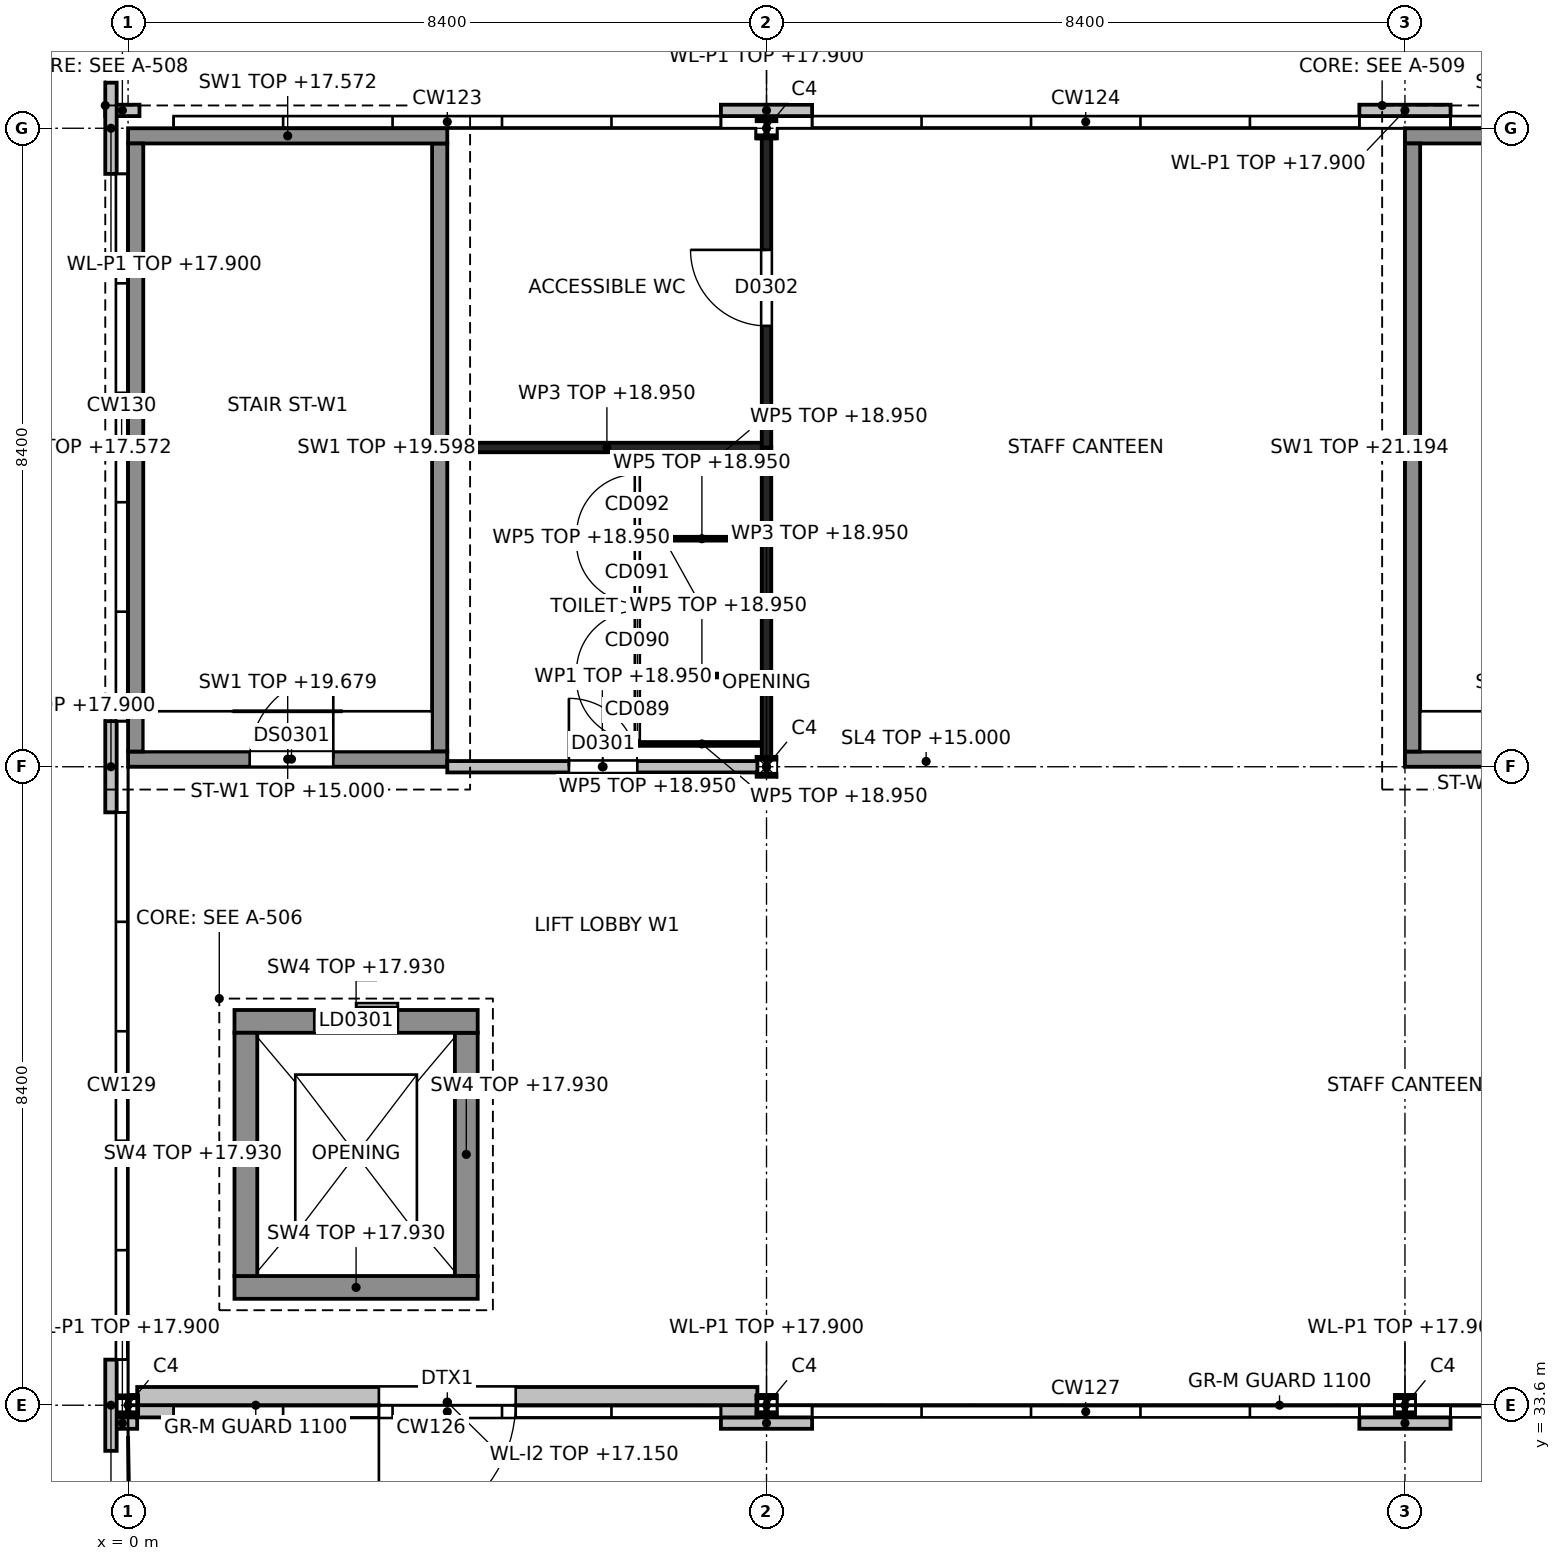
"""IFC4 building model, lengths in metres.
Left out: names, types, materials, properties, quantities, classifications, styles, units other than length and angle.
Written with IfcOpenShell. Run it as: python <this file> out.ifc"""

import sys

from ifc_helpers import new_model, si_unit, direction, frame, frame_2d, origin, origin_2d, place, context, subcontext, project, spatial, polyline, rectangle, i_section, outline, extrude, element, fill, save


model = new_model("IFC4")
c1 = context("Model", 3, precision=1e-05, world=origin(), true_north=direction((0.0, 1.0)))
c2 = subcontext(c1, "Body", "Model", "MODEL_VIEW")
j1 = project(units=[si_unit("LENGTHUNIT", "METRE"), si_unit("PLANEANGLEUNIT", "RADIAN")], contexts=[c1])
p1 = place(None, origin())
s1 = spatial("IfcSite", under=j1, at=p1, CompositionType="ELEMENT")
p2 = place(p1, origin())
s2 = spatial("IfcBuilding", under=s1, at=p2, CompositionType="ELEMENT")
p3 = place(p2, frame((0.0, 0.0, 15.0)))
s3 = spatial("IfcBuildingStorey", under=s2, at=p3, CompositionType="ELEMENT", Elevation=15.0)
for number, where, z_axis, x_axis in (
    (1, (0.0, 33.6, 0.0), (0.0, 0.0, 1.0), (1.0, 0.0, 0.0)),
    (2, (8.4, 33.6, 0.0), (0.0, 0.0, 1.0), (1.0, 0.0, 0.0)),
):
    element("IfcColumn", number, at=place(p3, frame(where, z_axis=z_axis, x_axis=x_axis)), inside=s3, PredefinedType="COLUMN", context=c2, shape_type="SweptSolid", body=[
        extrude(i_section(OverallWidth=0.24, OverallDepth=0.24, WebThickness=0.01, FlangeThickness=0.017, at=origin_2d()), origin(), (0.0, 0.0, 1.0), 2.635),
    ])
p4 = place(p3, frame((8.4, 42.0, 0.0), z_axis=(0.0, 0.0, 1.0), x_axis=(1.0, 0.0, 0.0)))
e3 = element("IfcColumn", 3, at=p4, inside=s3, PredefinedType="COLUMN", context=c2, shape_type="SweptSolid", body=[
    extrude(i_section(OverallWidth=0.24, OverallDepth=0.24, WebThickness=0.01, FlangeThickness=0.017, at=origin_2d()), origin(), (0.0, 0.0, 1.0), 6.029),
])
for number, where, z_axis, x_axis in (
    (4, (8.4, 50.4, 0.0), (0.0, 0.0, 1.0), (1.0, 0.0, 0.0)),
    (5, (16.8, 33.6, 0.0), (0.0, 0.0, 1.0), (1.0, 0.0, 0.0)),
):
    element("IfcColumn", number, at=place(p3, frame(where, z_axis=z_axis, x_axis=x_axis)), inside=s3, PredefinedType="COLUMN", context=c2, shape_type="SweptSolid", body=[
        extrude(i_section(OverallWidth=0.24, OverallDepth=0.24, WebThickness=0.01, FlangeThickness=0.017, at=origin_2d()), origin(), (0.0, 0.0, 1.0), 2.635),
    ])
p5 = place(p3, frame((0.0, 42.1, 0.0), z_axis=(0.0, 0.0, 1.0), x_axis=(1.0, 0.0, 0.0)))
e6 = element("IfcWall", 6, at=p5, inside=s3, PredefinedType="SHEAR", context=c2, shape_type="SweptSolid", body=[
    extrude(outline(polyline([(0.0, 0.0), (4.2, 0.0), (4.2, 4.679), (0.247, 3.082), (0.0, 2.572), (0.0, 0.0)])), frame((0.0, 0.1, 0.0), z_axis=(0.0, -1.0, 0.0), x_axis=(1.0, 0.0, 0.0)), (0.0, 0.0, 1.0), 0.2),
])
p6 = place(p5, frame((1.6, 0.0, 0.0)))
e7 = element("IfcOpeningElement", 7, at=p6, cuts=e6, PredefinedType="OPENING", context=c2, shape_type="SweptSolid", body=[
    extrude(rectangle(XDim=1.1, YDim=2.1, at=frame_2d((0.55, 1.05))), frame((0.0, 0.1, 0.0), z_axis=(0.0, -1.0, 0.0), x_axis=(1.0, 0.0, 0.0)), (0.0, 0.0, 1.0), 0.2),
])
p7 = place(p3, frame((0.0, 50.3, 0.0), z_axis=(0.0, 0.0, 1.0), x_axis=(1.0, 0.0, 0.0)))
e8 = element("IfcWall", 8, at=p7, inside=s3, PredefinedType="SHEAR", context=c2, shape_type="SweptSolid", body=[
    extrude(outline(polyline([(0.0, 0.0), (4.2, 0.0), (4.2, 2.572), (0.0, 2.572), (0.0, 0.0)])), frame((0.0, 0.1, 0.0), z_axis=(0.0, -1.0, 0.0), x_axis=(1.0, 0.0, 0.0)), (0.0, 0.0, 1.0), 0.2),
])
p8 = place(p3, frame((0.1, 42.2, 0.0), z_axis=(0.0, 0.0, 1.0), x_axis=(0.0, 1.0, 0.0)))
e9 = element("IfcWall", 9, at=p8, inside=s3, PredefinedType="SHEAR", context=c2, shape_type="SweptSolid", body=[
    extrude(outline(polyline([(0.0, 0.0), (8.0, 0.0), (8.0, 2.572), (0.0, 2.572), (0.0, 0.0)])), frame((0.0, 0.1, 0.0), z_axis=(0.0, -1.0, 0.0), x_axis=(1.0, 0.0, 0.0)), (0.0, 0.0, 1.0), 0.2),
])
p9 = place(p3, frame((4.1, 42.2, 0.0), z_axis=(0.0, 0.0, 1.0), x_axis=(0.0, 1.0, 0.0)))
e10 = element("IfcWall", 10, at=p9, inside=s3, PredefinedType="SHEAR", context=c2, shape_type="SweptSolid", body=[
    extrude(outline(polyline([(0.0, 0.0), (8.0, 0.0), (8.0, 3.062), (4.5, 4.477), (4.25, 4.177), (4.0, 4.228), (3.75, 4.598), (0.0, 4.598), (0.0, 0.0)])), frame((0.0, 0.1, 0.0), z_axis=(0.0, -1.0, 0.0), x_axis=(1.0, 0.0, 0.0)), (0.0, 0.0, 1.0), 0.2),
])
p10 = place(p3, frame((16.8, 42.1, 0.0), z_axis=(0.0, 0.0, 1.0), x_axis=(1.0, 0.0, 0.0)))
e11 = element("IfcWall", 11, at=p10, inside=s3, PredefinedType="SHEAR", context=c2, shape_type="SweptSolid", body=[
    extrude(outline(polyline([(0.0, 0.0), (4.2, 0.0), (4.2, 4.679), (0.494, 6.176), (0.247, 5.875), (0.0, 5.925), (0.0, 0.0)])), frame((0.0, 0.1, 0.0), z_axis=(0.0, -1.0, 0.0), x_axis=(1.0, 0.0, 0.0)), (0.0, 0.0, 1.0), 0.2),
])
p11 = place(p10, frame((1.6, 0.0, 0.0)))
e12 = element("IfcOpeningElement", 12, at=p11, cuts=e11, PredefinedType="OPENING", context=c2, shape_type="SweptSolid", body=[
    extrude(rectangle(XDim=1.1, YDim=2.1, at=frame_2d((0.55, 1.05))), frame((0.0, 0.1, 0.0), z_axis=(0.0, -1.0, 0.0), x_axis=(1.0, 0.0, 0.0)), (0.0, 0.0, 1.0), 0.2),
])
p12 = place(p3, frame((16.8, 50.3, 0.0), z_axis=(0.0, 0.0, 1.0), x_axis=(1.0, 0.0, 0.0)))
e13 = element("IfcWall", 13, at=p12, inside=s3, PredefinedType="SHEAR", context=c2, shape_type="SweptSolid", body=[
    extrude(outline(polyline([(0.0, 0.0), (4.2, 0.0), (4.2, 2.572), (0.0, 2.572), (0.0, 0.0)])), frame((0.0, 0.1, 0.0), z_axis=(0.0, -1.0, 0.0), x_axis=(1.0, 0.0, 0.0)), (0.0, 0.0, 1.0), 0.2),
])
p13 = place(p3, frame((16.9, 42.2, 0.0), z_axis=(0.0, 0.0, 1.0), x_axis=(0.0, 1.0, 0.0)))
e14 = element("IfcWall", 14, at=p13, inside=s3, PredefinedType="SHEAR", context=c2, shape_type="SweptSolid", body=[
    extrude(outline(polyline([(0.0, 0.0), (8.0, 0.0), (8.0, 3.062), (0.25, 6.194), (0.0, 5.885), (0.0, 0.0)])), frame((0.0, 0.1, 0.0), z_axis=(0.0, -1.0, 0.0), x_axis=(1.0, 0.0, 0.0)), (0.0, 0.0, 1.0), 0.2),
])
p14 = place(p3, frame((1.4, 35.15, 0.0), z_axis=(0.0, 0.0, 1.0), x_axis=(1.0, 0.0, 0.0)))
e15 = element("IfcWall", 15, at=p14, inside=s3, PredefinedType="SHEAR", context=c2, shape_type="SweptSolid", body=[
    extrude(rectangle(XDim=3.2, YDim=0.3, at=frame_2d((1.6, 0.0))), origin(), (0.0, 0.0, 1.0), 2.93),
])
p15 = place(p3, frame((1.4, 38.65, 0.0), z_axis=(0.0, 0.0, 1.0), x_axis=(1.0, 0.0, 0.0)))
e16 = element("IfcWall", 16, at=p15, inside=s3, PredefinedType="SHEAR", context=c2, shape_type="SweptSolid", body=[
    extrude(rectangle(XDim=3.2, YDim=0.3, at=frame_2d((1.6, 0.0))), origin(), (0.0, 0.0, 1.0), 2.93),
])
p16 = place(p15, frame((1.05, 0.0, 0.0)))
e17 = element("IfcOpeningElement", 17, at=p16, cuts=e16, PredefinedType="OPENING", context=c2, shape_type="SweptSolid", body=[
    extrude(rectangle(XDim=1.1, YDim=2.1, at=frame_2d((0.55, 1.05))), frame((0.0, 0.15, 0.0), z_axis=(0.0, -1.0, 0.0), x_axis=(1.0, 0.0, 0.0)), (0.0, 0.0, 1.0), 0.3),
])
for number, where, z_axis, x_axis in (
    (18, (1.55, 35.3, 0.0), (0.0, 0.0, 1.0), (0.0, 1.0, 0.0)),
    (19, (4.45, 35.3, 0.0), (0.0, 0.0, 1.0), (0.0, 1.0, 0.0)),
):
    element("IfcWall", number, at=place(p3, frame(where, z_axis=z_axis, x_axis=x_axis)), inside=s3, PredefinedType="SHEAR", context=c2, shape_type="SweptSolid", body=[
        extrude(rectangle(XDim=3.2, YDim=0.3, at=frame_2d((1.6, 0.0))), origin(), (0.0, 0.0, 1.0), 2.93),
    ])
p17 = place(p3, frame((-0.225, 33.0, 0.0), z_axis=(0.0, 0.0, 1.0), x_axis=(0.0, 1.0, 0.0)))
e20 = element("IfcWall", 20, at=p17, inside=s3, PredefinedType="SOLIDWALL", context=c2, shape_type="SweptSolid", body=[
    extrude(rectangle(XDim=1.2, YDim=0.15, at=frame_2d((0.6, 0.0))), origin(), (0.0, 0.0, 1.0), 2.9),
])
p18 = place(p3, frame((-0.225, 41.4, 0.0), z_axis=(0.0, 0.0, 1.0), x_axis=(0.0, 1.0, 0.0)))
e21 = element("IfcWall", 21, at=p18, inside=s3, PredefinedType="SOLIDWALL", context=c2, shape_type="SweptSolid", body=[
    extrude(rectangle(XDim=1.2, YDim=0.15, at=frame_2d((0.6, 0.0))), origin(), (0.0, 0.0, 1.0), 2.9),
])
p19 = place(p3, frame((-0.225, 49.8, 0.0), z_axis=(0.0, 0.0, 1.0), x_axis=(0.0, 1.0, 0.0)))
e22 = element("IfcWall", 22, at=p19, inside=s3, PredefinedType="SOLIDWALL", context=c2, shape_type="SweptSolid", body=[
    extrude(rectangle(XDim=1.2, YDim=0.15, at=frame_2d((0.6, 0.0))), origin(), (0.0, 0.0, 1.0), 2.9),
])
p20 = place(p3, frame((-0.3, 50.635, 0.0), z_axis=(0.0, 0.0, 1.0), x_axis=(1.0, 0.0, 0.0)))
e23 = element("IfcWall", 23, at=p20, inside=s3, PredefinedType="SOLIDWALL", context=c2, shape_type="SweptSolid", body=[
    extrude(rectangle(XDim=0.45, YDim=0.15, at=frame_2d((0.225, 0.0))), origin(), (0.0, 0.0, 1.0), 2.9),
])
for number, where, z_axis, x_axis in (
    (24, (7.8, 50.635, 0.0), (0.0, 0.0, 1.0), (1.0, 0.0, 0.0)),
    (25, (16.2, 50.635, 0.0), (0.0, 0.0, 1.0), (1.0, 0.0, 0.0)),
):
    element("IfcWall", number, at=place(p3, frame(where, z_axis=z_axis, x_axis=x_axis)), inside=s3, PredefinedType="SOLIDWALL", context=c2, shape_type="SweptSolid", body=[
        extrude(rectangle(XDim=1.2, YDim=0.15, at=frame_2d((0.6, 0.0))), origin(), (0.0, 0.0, 1.0), 2.9),
    ])
p21 = place(p3, frame((0.12, 33.64, 0.0), z_axis=(0.0, 0.0, 1.0), x_axis=(1.0, 0.0, 0.0)))
e26 = element("IfcWall", 26, at=p21, inside=s3, PredefinedType="SOLIDWALL", context=c2, shape_type="SweptSolid", body=[
    extrude(rectangle(XDim=8.16, YDim=0.4, at=frame_2d((4.08, 0.0))), origin(), (0.0, 0.0, 1.0), 2.15),
])
p22 = place(p21, frame((3.18, 0.0, 0.0)))
e27 = element("IfcOpeningElement", 27, at=p22, cuts=e26, PredefinedType="OPENING", context=c2, shape_type="SweptSolid", body=[
    extrude(rectangle(XDim=1.8, YDim=2.4, at=frame_2d((0.9, 1.2))), frame((0.0, 0.2, 0.0), z_axis=(0.0, -1.0, 0.0), x_axis=(1.0, 0.0, 0.0)), (0.0, 0.0, 1.0), 0.4),
])
p23 = place(p3, frame((-0.27, 33.365, 0.0), z_axis=(0.0, 0.0, 1.0), x_axis=(1.0, 0.0, 0.0)))
e28 = element("IfcWall", 28, at=p23, inside=s3, PredefinedType="SOLIDWALL", context=c2, shape_type="SweptSolid", body=[
    extrude(rectangle(XDim=0.39, YDim=0.15, at=frame_2d((0.195, 0.0))), origin(), (0.0, 0.0, 1.0), 2.9),
])
for number, where, z_axis, x_axis in (
    (29, (7.8, 33.365, 0.0), (0.0, 0.0, 1.0), (1.0, 0.0, 0.0)),
    (30, (16.2, 33.365, 0.0), (0.0, 0.0, 1.0), (1.0, 0.0, 0.0)),
):
    element("IfcWall", number, at=place(p3, frame(where, z_axis=z_axis, x_axis=x_axis)), inside=s3, PredefinedType="SOLIDWALL", context=c2, shape_type="SweptSolid", body=[
        extrude(rectangle(XDim=1.2, YDim=0.15, at=frame_2d((0.6, 0.0))), origin(), (0.0, 0.0, 1.0), 2.9),
    ])
p24 = place(p3, frame((4.2, 42.0, 0.0), z_axis=(0.0, 0.0, 1.0), x_axis=(1.0, 0.0, 0.0)))
e31 = element("IfcWall", 31, at=p24, inside=s3, PredefinedType="PARTITIONING", context=c2, shape_type="SweptSolid", body=[
    extrude(rectangle(XDim=4.08, YDim=0.15, at=frame_2d((2.04, 0.0))), origin(), (0.0, 0.0, 1.0), 3.95),
])
p25 = place(p24, frame((1.6, 0.0, 0.0)))
e32 = element("IfcOpeningElement", 32, at=p25, cuts=e31, PredefinedType="OPENING", context=c2, shape_type="SweptSolid", body=[
    extrude(rectangle(XDim=0.9, YDim=2.1, at=frame_2d((0.45, 1.05))), frame((0.0, 0.075, 0.0), z_axis=(0.0, -1.0, 0.0), x_axis=(1.0, 0.0, 0.0)), (0.0, 0.0, 1.0), 0.15),
])
p26 = place(p3, frame((4.2, 46.2, 0.0), z_axis=(0.0, 0.0, 1.0), x_axis=(1.0, 0.0, 0.0)))
e33 = element("IfcWall", 33, at=p26, inside=s3, PredefinedType="PARTITIONING", context=c2, shape_type="SweptSolid", body=[
    extrude(rectangle(XDim=4.2, YDim=0.125, at=frame_2d((2.1, 0.0))), origin(), (0.0, 0.0, 1.0), 3.95),
])
p27 = place(p3, frame((8.4, 42.12, 0.0), z_axis=(0.0, 0.0, 1.0), x_axis=(0.0, 1.0, 0.0)))
e34 = element("IfcWall", 34, at=p27, inside=s3, PredefinedType="PARTITIONING", context=c2, shape_type="SweptSolid", body=[
    extrude(rectangle(XDim=4.08, YDim=0.125, at=frame_2d((2.04, 0.0))), origin(), (0.0, 0.0, 1.0), 3.95),
])
p28 = place(p3, frame((8.4, 46.2, 0.0), z_axis=(0.0, 0.0, 1.0), x_axis=(0.0, 1.0, 0.0)))
e35 = element("IfcWall", 35, at=p28, inside=s3, PredefinedType="PARTITIONING", context=c2, shape_type="SweptSolid", body=[
    extrude(rectangle(XDim=4.08, YDim=0.125, at=frame_2d((2.04, 0.0))), origin(), (0.0, 0.0, 1.0), 3.95),
])
p29 = place(p28, frame((1.6, 0.0, 0.0)))
e36 = element("IfcOpeningElement", 36, at=p29, cuts=e35, PredefinedType="OPENING", context=c2, shape_type="SweptSolid", body=[
    extrude(rectangle(XDim=1.0, YDim=2.1, at=frame_2d((0.5, 1.05))), frame((0.0, 0.062, 0.0), z_axis=(0.0, -1.0, 0.0), x_axis=(1.0, 0.0, 0.0)), (0.0, 0.0, 1.0), 0.125),
])
p30 = place(p3, frame((6.7, 42.3, 0.0), z_axis=(0.0, 0.0, 1.0), x_axis=(0.0, 1.0, 0.0)))
e37 = element("IfcWall", 37, at=p30, inside=s3, PredefinedType="PARTITIONING", context=c2, shape_type="SweptSolid", body=[
    extrude(rectangle(XDim=3.6, YDim=0.05, at=frame_2d((1.8, 0.0))), origin(), (0.0, 0.0, 1.0), 3.95),
])
p31 = place(p30, frame((0.05, 0.0, 0.0)))
e38 = element("IfcOpeningElement", 38, at=p31, cuts=e37, PredefinedType="OPENING", context=c2, shape_type="SweptSolid", body=[
    extrude(rectangle(XDim=0.8, YDim=2.0, at=frame_2d((0.4, 1.0))), frame((0.0, 0.025, 0.0), z_axis=(0.0, -1.0, 0.0), x_axis=(1.0, 0.0, 0.0)), (0.0, 0.0, 1.0), 0.05),
])
p32 = place(p30, frame((0.95, 0.0, 0.0)))
e39 = element("IfcOpeningElement", 39, at=p32, cuts=e37, PredefinedType="OPENING", context=c2, shape_type="SweptSolid", body=[
    extrude(rectangle(XDim=0.8, YDim=2.0, at=frame_2d((0.4, 1.0))), frame((0.0, 0.025, 0.0), z_axis=(0.0, -1.0, 0.0), x_axis=(1.0, 0.0, 0.0)), (0.0, 0.0, 1.0), 0.05),
])
p33 = place(p30, frame((1.85, 0.0, 0.0)))
e40 = element("IfcOpeningElement", 40, at=p33, cuts=e37, PredefinedType="OPENING", context=c2, shape_type="SweptSolid", body=[
    extrude(rectangle(XDim=0.8, YDim=2.0, at=frame_2d((0.4, 1.0))), frame((0.0, 0.025, 0.0), z_axis=(0.0, -1.0, 0.0), x_axis=(1.0, 0.0, 0.0)), (0.0, 0.0, 1.0), 0.05),
])
p34 = place(p30, frame((2.75, 0.0, 0.0)))
e41 = element("IfcOpeningElement", 41, at=p34, cuts=e37, PredefinedType="OPENING", context=c2, shape_type="SweptSolid", body=[
    extrude(rectangle(XDim=0.8, YDim=2.0, at=frame_2d((0.4, 1.0))), frame((0.0, 0.025, 0.0), z_axis=(0.0, -1.0, 0.0), x_axis=(1.0, 0.0, 0.0)), (0.0, 0.0, 1.0), 0.05),
])
for number, where, z_axis, x_axis in (
    (42, (8.4, 42.3, 0.0), (0.0, 0.0, 1.0), (-1.0, 0.0, 0.0)),
    (43, (8.4, 43.2, 0.0), (0.0, 0.0, 1.0), (-1.0, 0.0, 0.0)),
    (44, (8.4, 44.1, 0.0), (0.0, 0.0, 1.0), (-1.0, 0.0, 0.0)),
    (45, (8.4, 45.0, 0.0), (0.0, 0.0, 1.0), (-1.0, 0.0, 0.0)),
    (46, (8.4, 45.9, 0.0), (0.0, 0.0, 1.0), (-1.0, 0.0, 0.0)),
):
    element("IfcWall", number, at=place(p3, frame(where, z_axis=z_axis, x_axis=x_axis)), inside=s3, PredefinedType="PARTITIONING", context=c2, shape_type="SweptSolid", body=[
        extrude(rectangle(XDim=1.7, YDim=0.05, at=frame_2d((0.85, 0.0))), origin(), (0.0, 0.0, 1.0), 3.95),
    ])
p35 = place(p22, origin())
e47 = element("IfcDoor", 47, at=p35, inside=s3, OperationType="DOUBLE_DOOR_SINGLE_SWING", PredefinedType="DOOR", context=c2, shape_type="SweptSolid", body=[
    extrude(rectangle(XDim=1.8, YDim=2.4, at=frame_2d((0.9, 1.2))), frame((0.0, 0.025, 0.0), z_axis=(0.0, -1.0, 0.0), x_axis=(1.0, 0.0, 0.0)), (0.0, 0.0, 1.0), 0.05),
])
fill(e27, e47)
p36 = place(p25, origin())
e48 = element("IfcDoor", 48, at=p36, inside=s3, OperationType="SINGLE_SWING_LEFT", PredefinedType="DOOR", context=c2, shape_type="SweptSolid", body=[
    extrude(rectangle(XDim=0.9, YDim=2.1, at=frame_2d((0.45, 1.05))), frame((0.0, 0.025, 0.0), z_axis=(0.0, -1.0, 0.0), x_axis=(1.0, 0.0, 0.0)), (0.0, 0.0, 1.0), 0.05),
])
fill(e32, e48)
p37 = place(p29, origin())
e49 = element("IfcDoor", 49, at=p37, inside=s3, OperationType="SINGLE_SWING_RIGHT", PredefinedType="DOOR", context=c2, shape_type="SweptSolid", body=[
    extrude(rectangle(XDim=1.0, YDim=2.1, at=frame_2d((0.5, 1.05))), frame((0.0, 0.025, 0.0), z_axis=(0.0, -1.0, 0.0), x_axis=(1.0, 0.0, 0.0)), (0.0, 0.0, 1.0), 0.05),
])
fill(e36, e49)
p38 = place(p6, origin())
e50 = element("IfcDoor", 50, at=p38, inside=s3, OperationType="SINGLE_SWING_RIGHT", PredefinedType="DOOR", context=c2, shape_type="SweptSolid", body=[
    extrude(rectangle(XDim=1.1, YDim=2.1, at=frame_2d((0.55, 1.05))), frame((0.0, 0.025, 0.0), z_axis=(0.0, -1.0, 0.0), x_axis=(1.0, 0.0, 0.0)), (0.0, 0.0, 1.0), 0.05),
])
fill(e7, e50)
p39 = place(p16, origin())
e51 = element("IfcDoor", 51, at=p39, inside=s3, OperationType="SLIDING_TO_LEFT", PredefinedType="DOOR", context=c2, shape_type="SweptSolid", body=[
    extrude(rectangle(XDim=1.1, YDim=2.1, at=frame_2d((0.55, 1.05))), frame((0.0, 0.025, 0.0), z_axis=(0.0, -1.0, 0.0), x_axis=(1.0, 0.0, 0.0)), (0.0, 0.0, 1.0), 0.05),
])
fill(e17, e51)
p40 = place(p31, origin())
e52 = element("IfcDoor", 52, at=p40, inside=s3, OperationType="SINGLE_SWING_RIGHT", PredefinedType="DOOR", context=c2, shape_type="SweptSolid", body=[
    extrude(rectangle(XDim=0.8, YDim=2.0, at=frame_2d((0.4, 1.0))), frame((0.0, 0.025, 0.0), z_axis=(0.0, -1.0, 0.0), x_axis=(1.0, 0.0, 0.0)), (0.0, 0.0, 1.0), 0.05),
])
fill(e38, e52)
p41 = place(p32, origin())
e53 = element("IfcDoor", 53, at=p41, inside=s3, OperationType="SINGLE_SWING_LEFT", PredefinedType="DOOR", context=c2, shape_type="SweptSolid", body=[
    extrude(rectangle(XDim=0.8, YDim=2.0, at=frame_2d((0.4, 1.0))), frame((0.0, 0.025, 0.0), z_axis=(0.0, -1.0, 0.0), x_axis=(1.0, 0.0, 0.0)), (0.0, 0.0, 1.0), 0.05),
])
fill(e39, e53)
p42 = place(p33, origin())
e54 = element("IfcDoor", 54, at=p42, inside=s3, OperationType="SINGLE_SWING_RIGHT", PredefinedType="DOOR", context=c2, shape_type="SweptSolid", body=[
    extrude(rectangle(XDim=0.8, YDim=2.0, at=frame_2d((0.4, 1.0))), frame((0.0, 0.025, 0.0), z_axis=(0.0, -1.0, 0.0), x_axis=(1.0, 0.0, 0.0)), (0.0, 0.0, 1.0), 0.05),
])
fill(e40, e54)
p43 = place(p34, origin())
e55 = element("IfcDoor", 55, at=p43, inside=s3, OperationType="SINGLE_SWING_LEFT", PredefinedType="DOOR", context=c2, shape_type="SweptSolid", body=[
    extrude(rectangle(XDim=0.8, YDim=2.0, at=frame_2d((0.4, 1.0))), frame((0.0, 0.025, 0.0), z_axis=(0.0, -1.0, 0.0), x_axis=(1.0, 0.0, 0.0)), (0.0, 0.0, 1.0), 0.05),
])
fill(e41, e55)
save(model, sys.argv[1])
